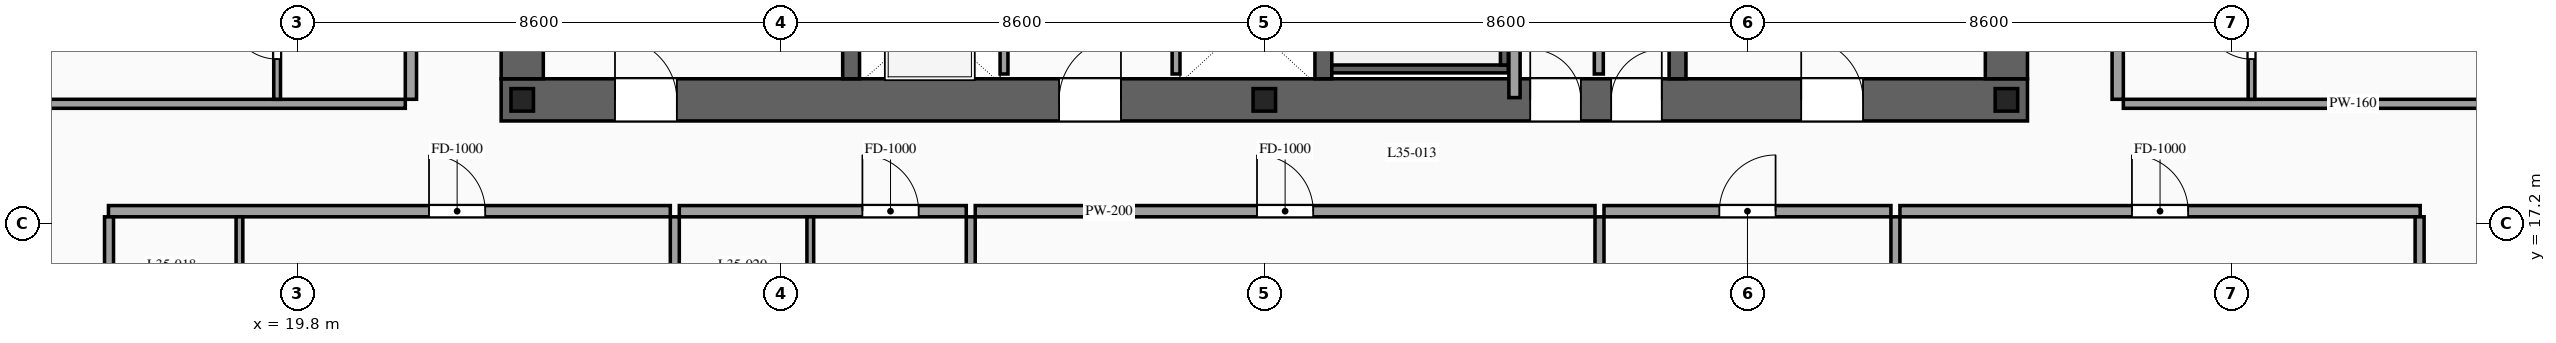
"""IFC4 building model, lengths in metres.
Left out: names, types, materials, properties, quantities, classifications, styles, units other than length and angle.
Written with IfcOpenShell. Run it as: python <this file> out.ifc"""

import sys

from ifc_helpers import new_model, si_unit, direction, frame, frame_2d, origin, origin_2d, place, context, subcontext, project, spatial, rectangle, i_section, extrude, source, transform, mapped, element, fill, save


model = new_model("IFC4")
c1 = context("Model", 3, precision=1e-05, world=origin(), true_north=direction((0.0, 1.0)))
c2 = subcontext(c1, "Body", "Model", "MODEL_VIEW")
j1 = project(units=[si_unit("LENGTHUNIT", "METRE"), si_unit("PLANEANGLEUNIT", "RADIAN")], contexts=[c1])
p1 = place(None, origin())
s1 = spatial("IfcSite", under=j1, at=p1, CompositionType="ELEMENT")
p2 = place(p1, origin())
s2 = spatial("IfcBuilding", under=s1, at=p2, CompositionType="ELEMENT")
p3 = place(p2, frame((0.0, 0.0, 134.4)))
s3 = spatial("IfcBuildingStorey", under=s2, at=p3, CompositionType="ELEMENT", Elevation=134.4)
p4 = place(p3, frame((23.425, 19.4, 0.0), z_axis=(0.0, 0.0, 1.0), x_axis=(1.0, 0.0, 0.0)))
e1 = element("IfcWall", 1, at=p4, inside=s3, PredefinedType="SHEAR", context=c2, shape_type="SweptSolid", body=[
    extrude(rectangle(XDim=27.15, YDim=0.75, at=frame_2d((13.575, 0.0))), origin(), (0.0, 0.0, 1.0), 3.6),
])
p5 = place(p4, frame((2.025, 0.0, 0.0)))
e2 = element("IfcOpeningElement", 2, at=p5, cuts=e1, PredefinedType="OPENING", context=c2, shape_type="SweptSolid", body=[
    extrude(rectangle(XDim=1.1, YDim=2.2, at=frame_2d((0.55, 1.1))), frame((0.0, 0.39, 0.0), z_axis=(0.0, -1.0, 0.0), x_axis=(1.0, 0.0, 0.0)), (0.0, 0.0, 1.0), 0.78),
])
p6 = place(p4, frame((9.925, 0.0, 0.0)))
e3 = element("IfcOpeningElement", 3, at=p6, cuts=e1, PredefinedType="OPENING", context=c2, shape_type="SweptSolid", body=[
    extrude(rectangle(XDim=1.1, YDim=2.2, at=frame_2d((0.55, 1.1))), frame((0.0, 0.39, 0.0), z_axis=(0.0, -1.0, 0.0), x_axis=(1.0, 0.0, 0.0)), (0.0, 0.0, 1.0), 0.78),
])
p7 = place(p4, frame((23.125, 0.0, 0.0)))
e4 = element("IfcOpeningElement", 4, at=p7, cuts=e1, PredefinedType="OPENING", context=c2, shape_type="SweptSolid", body=[
    extrude(rectangle(XDim=1.1, YDim=2.2, at=frame_2d((0.55, 1.1))), frame((0.0, 0.39, 0.0), z_axis=(0.0, -1.0, 0.0), x_axis=(1.0, 0.0, 0.0)), (0.0, 0.0, 1.0), 0.78),
])
p8 = place(p4, frame((19.745, 0.0, 0.0)))
e5 = element("IfcOpeningElement", 5, at=p8, cuts=e1, PredefinedType="OPENING", context=c2, shape_type="SweptSolid", body=[
    extrude(rectangle(XDim=0.9, YDim=2.15, at=frame_2d((0.45, 1.075))), frame((0.0, 0.39, 0.0), z_axis=(0.0, -1.0, 0.0), x_axis=(1.0, 0.0, 0.0)), (0.0, 0.0, 1.0), 0.78),
])
p9 = place(p4, frame((18.305, 0.0, 0.0)))
e6 = element("IfcOpeningElement", 6, at=p9, cuts=e1, PredefinedType="OPENING", context=c2, shape_type="SweptSolid", body=[
    extrude(rectangle(XDim=0.9, YDim=2.15, at=frame_2d((0.45, 1.075))), frame((0.0, 0.39, 0.0), z_axis=(0.0, -1.0, 0.0), x_axis=(1.0, 0.0, 0.0)), (0.0, 0.0, 1.0), 0.78),
])
m1 = source(origin(), c2, "Body", "SweptSolid", [
    extrude(rectangle(XDim=12.05, YDim=0.75, at=frame_2d((6.025, 0.0))), origin(), (0.0, 0.0, 1.0), 3.6),
])
for number, where, z_axis, x_axis in (
    (7, (23.8, 19.775, 0.0), (0.0, 0.0, 1.0), (0.0, 1.0, 0.0)),
    (8, (50.2, 19.775, 0.0), (0.0, 0.0, 1.0), (0.0, 1.0, 0.0)),
):
    element("IfcWall", number, at=place(p3, frame(where, z_axis=z_axis, x_axis=x_axis)), inside=s3, PredefinedType="SHEAR", context=c2, shape_type="MappedRepresentation", body=[
        mapped(m1, transform((0.0, 0.0, 0.0), scale=1.0)),
    ])
m2 = source(origin(), c2, "Body", "SweptSolid", [
    extrude(rectangle(XDim=12.05, YDim=0.3, at=frame_2d((6.025, 0.0))), origin(), (0.0, 0.0, 1.0), 3.6),
])
for number, where, z_axis, x_axis in (
    (9, (29.65, 19.775, 0.0), (0.0, 0.0, 1.0), (0.0, 1.0, 0.0)),
    (10, (38.05, 19.775, 0.0), (0.0, 0.0, 1.0), (0.0, 1.0, 0.0)),
    (11, (44.35, 19.775, 0.0), (0.0, 0.0, 1.0), (0.0, 1.0, 0.0)),
):
    element("IfcWall", number, at=place(p3, frame(where, z_axis=z_axis, x_axis=x_axis)), inside=s3, PredefinedType="SOLIDWALL", context=c2, shape_type="MappedRepresentation", body=[
        mapped(m2, transform((0.0, 0.0, 0.0), scale=1.0)),
    ])
m3 = source(origin(), c2, "Body", "SweptSolid", [
    extrude(i_section(OverallWidth=0.4, OverallDepth=0.4, WebThickness=0.013, FlangeThickness=0.021, at=origin_2d()), origin(), (0.0, 0.0, 1.0), 3.6),
])
for number, where, z_axis, x_axis in (
    (12, (23.8, 19.4, 0.0), (0.0, 0.0, 1.0), (1.0, 0.0, 0.0)),
    (13, (37.0, 19.4, 0.0), (0.0, 0.0, 1.0), (1.0, 0.0, 0.0)),
    (14, (50.2, 19.4, 0.0), (0.0, 0.0, 1.0), (1.0, 0.0, 0.0)),
):
    element("IfcColumn", number, at=place(p3, frame(where, z_axis=z_axis, x_axis=x_axis)), inside=s3, PredefinedType="COLUMN", context=c2, shape_type="MappedRepresentation", body=[
        mapped(m3, transform((0.0, 0.0, 0.0), scale=1.0)),
    ])
p10 = place(p3, frame((32.37, 19.86, 0.0), z_axis=(0.0, 0.0, 1.0), x_axis=(0.0, 1.0, 0.0)))
e15 = element("IfcWall", 15, at=p10, inside=s3, PredefinedType="SOLIDWALL", context=c2, shape_type="SweptSolid", body=[
    extrude(rectangle(XDim=2.04, YDim=0.14, at=frame_2d((1.02, 0.0))), origin(), (0.0, 0.0, 1.0), 3.38),
])
p11 = place(p10, frame((0.47, 0.0, 0.0)))
e16 = element("IfcOpeningElement", 16, at=p11, cuts=e15, PredefinedType="OPENING", context=c2, shape_type="SweptSolid", body=[
    extrude(rectangle(XDim=1.1, YDim=2.2, at=frame_2d((0.55, 1.1))), frame((0.0, 0.085, 0.0), z_axis=(0.0, -1.0, 0.0), x_axis=(1.0, 0.0, 0.0)), (0.0, 0.0, 1.0), 0.17),
])
m4 = source(origin(), c2, "Body", "SweptSolid", [
    extrude(rectangle(XDim=2.04, YDim=0.14, at=frame_2d((1.02, 0.0))), origin(), (0.0, 0.0, 1.0), 3.38),
])
p12 = place(p3, frame((35.43, 19.86, 0.0), z_axis=(0.0, 0.0, 1.0), x_axis=(0.0, 1.0, 0.0)))
e17 = element("IfcWall", 17, at=p12, inside=s3, PredefinedType="SOLIDWALL", context=c2, shape_type="MappedRepresentation", body=[
    mapped(m4, transform((0.0, 0.0, 0.0), scale=1.0)),
])
m5 = source(origin(), c2, "Body", "SweptSolid", [
    extrude(rectangle(XDim=3.14, YDim=0.14, at=frame_2d((1.57, 0.0))), origin(), (0.0, 0.0, 1.0), 3.38),
])
p13 = place(p3, frame((38.2, 19.95, 0.0), z_axis=(0.0, 0.0, 1.0), x_axis=(1.0, 0.0, 0.0)))
e18 = element("IfcWall", 18, at=p13, inside=s3, PredefinedType="SOLIDWALL", context=c2, shape_type="MappedRepresentation", body=[
    mapped(m5, transform((0.0, 0.0, 0.0), scale=1.0)),
])
m6 = source(origin(), c2, "Body", "SweptSolid", [
    extrude(rectangle(XDim=8.94, YDim=0.14, at=frame_2d((4.47, 0.0))), origin(), (0.0, 0.0, 1.0), 3.38),
])
p14 = place(p3, frame((41.27, 20.02, 0.0), z_axis=(0.0, 0.0, 1.0), x_axis=(0.0, 1.0, 0.0)))
e19 = element("IfcWall", 19, at=p14, inside=s3, PredefinedType="SOLIDWALL", context=c2, shape_type="MappedRepresentation", body=[
    mapped(m6, transform((0.0, 0.0, 0.0), scale=1.0)),
])
m7 = source(origin(), c2, "Body", "SweptSolid", [
    extrude(rectangle(XDim=1.34, YDim=0.16, at=frame_2d((0.67, 0.0))), origin(), (0.0, 0.0, 1.0), 3.38),
])
p15 = place(p3, frame((42.95, 19.86, 0.0), z_axis=(0.0, 0.0, 1.0), x_axis=(0.0, 1.0, 0.0)))
e20 = element("IfcWall", 20, at=p15, inside=s3, PredefinedType="PARTITIONING", context=c2, shape_type="MappedRepresentation", body=[
    mapped(m7, transform((0.0, 0.0, 0.0), scale=1.0)),
])
m8 = source(origin(), c2, "Body", "SweptSolid", [
    extrude(rectangle(XDim=6.51, YDim=0.2, at=frame_2d((3.255, 0.0))), origin(), (0.0, 0.0, 1.0), 3.38),
])
p16 = place(p3, frame((41.45, 19.44, 0.0), z_axis=(0.0, 0.0, 1.0), x_axis=(0.0, 1.0, 0.0)))
e21 = element("IfcWall", 21, at=p16, inside=s3, PredefinedType="PARTITIONING", context=c2, shape_type="MappedRepresentation", body=[
    mapped(m8, transform((0.0, 0.0, 0.0), scale=1.0)),
])
p17 = place(p3, frame((16.44, 17.42, 0.0), z_axis=(0.0, 0.0, 1.0), x_axis=(1.0, 0.0, 0.0)))
e22 = element("IfcWall", 22, at=p17, inside=s3, PredefinedType="PARTITIONING", context=c2, shape_type="SweptSolid", body=[
    extrude(rectangle(XDim=9.994, YDim=0.2, at=frame_2d((4.997, 0.0))), origin(), (0.0, 0.0, 1.0), 3.38),
])
p18 = place(p17, frame((5.702, 0.0, 0.0)))
e23 = element("IfcOpeningElement", 23, at=p18, cuts=e22, PredefinedType="OPENING", context=c2, shape_type="SweptSolid", body=[
    extrude(rectangle(XDim=1.0, YDim=2.2, at=frame_2d((0.5, 1.1))), frame((0.0, 0.115, 0.0), z_axis=(0.0, -1.0, 0.0), x_axis=(1.0, 0.0, 0.0)), (0.0, 0.0, 1.0), 0.23),
])
m9 = source(origin(), c2, "Body", "SweptSolid", [
    extrude(rectangle(XDim=14.97, YDim=0.16, at=frame_2d((7.485, 0.0))), origin(), (0.0, 0.0, 1.0), 3.38),
])
p19 = place(p3, frame((26.514, 2.35, 0.0), z_axis=(0.0, 0.0, 1.0), x_axis=(0.0, 1.0, 0.0)))
e24 = element("IfcWall", 24, at=p19, inside=s3, PredefinedType="PARTITIONING", context=c2, shape_type="MappedRepresentation", body=[
    mapped(m9, transform((0.0, 0.0, 0.0), scale=1.0)),
])
m10 = source(origin(), c2, "Body", "SweptSolid", [
    extrude(rectangle(XDim=2.42, YDim=0.12, at=frame_2d((1.21, 0.0))), origin(), (0.0, 0.0, 1.0), 3.38),
])
p20 = place(p3, frame((18.77, 14.9, 0.0), z_axis=(0.0, 0.0, 1.0), x_axis=(0.0, 1.0, 0.0)))
e25 = element("IfcWall", 25, at=p20, inside=s3, PredefinedType="PARTITIONING", context=c2, shape_type="MappedRepresentation", body=[
    mapped(m10, transform((0.0, 0.0, 0.0), scale=1.0)),
])
p21 = place(p3, frame((26.594, 17.42, 0.0), z_axis=(0.0, 0.0, 1.0), x_axis=(1.0, 0.0, 0.0)))
e26 = element("IfcWall", 26, at=p21, inside=s3, PredefinedType="PARTITIONING", context=c2, shape_type="SweptSolid", body=[
    extrude(rectangle(XDim=5.104, YDim=0.2, at=frame_2d((2.552, 0.0))), origin(), (0.0, 0.0, 1.0), 3.38),
])
p22 = place(p21, frame((3.257, 0.0, 0.0)))
e27 = element("IfcOpeningElement", 27, at=p22, cuts=e26, PredefinedType="OPENING", context=c2, shape_type="SweptSolid", body=[
    extrude(rectangle(XDim=1.0, YDim=2.2, at=frame_2d((0.5, 1.1))), frame((0.0, 0.115, 0.0), z_axis=(0.0, -1.0, 0.0), x_axis=(1.0, 0.0, 0.0)), (0.0, 0.0, 1.0), 0.23),
])
p23 = place(p3, frame((31.778, 2.35, 0.0), z_axis=(0.0, 0.0, 1.0), x_axis=(0.0, 1.0, 0.0)))
e28 = element("IfcWall", 28, at=p23, inside=s3, PredefinedType="PARTITIONING", context=c2, shape_type="MappedRepresentation", body=[
    mapped(m9, transform((0.0, 0.0, 0.0), scale=1.0)),
])
p24 = place(p3, frame((28.924, 14.9, 0.0), z_axis=(0.0, 0.0, 1.0), x_axis=(0.0, 1.0, 0.0)))
e29 = element("IfcWall", 29, at=p24, inside=s3, PredefinedType="PARTITIONING", context=c2, shape_type="MappedRepresentation", body=[
    mapped(m10, transform((0.0, 0.0, 0.0), scale=1.0)),
])
p25 = place(p3, frame((31.858, 17.42, 0.0), z_axis=(0.0, 0.0, 1.0), x_axis=(1.0, 0.0, 0.0)))
e30 = element("IfcWall", 30, at=p25, inside=s3, PredefinedType="PARTITIONING", context=c2, shape_type="SweptSolid", body=[
    extrude(rectangle(XDim=11.024, YDim=0.2, at=frame_2d((5.512, 0.0))), origin(), (0.0, 0.0, 1.0), 3.38),
])
p26 = place(p25, frame((5.012, 0.0, 0.0)))
e31 = element("IfcOpeningElement", 31, at=p26, cuts=e30, PredefinedType="OPENING", context=c2, shape_type="SweptSolid", body=[
    extrude(rectangle(XDim=1.0, YDim=2.2, at=frame_2d((0.5, 1.1))), frame((0.0, 0.115, 0.0), z_axis=(0.0, -1.0, 0.0), x_axis=(1.0, 0.0, 0.0)), (0.0, 0.0, 1.0), 0.23),
])
p27 = place(p3, frame((42.962, 2.35, 0.0), z_axis=(0.0, 0.0, 1.0), x_axis=(0.0, 1.0, 0.0)))
e32 = element("IfcWall", 32, at=p27, inside=s3, PredefinedType="PARTITIONING", context=c2, shape_type="MappedRepresentation", body=[
    mapped(m9, transform((0.0, 0.0, 0.0), scale=1.0)),
])
p28 = place(p3, frame((43.042, 17.42, 0.0), z_axis=(0.0, 0.0, 1.0), x_axis=(1.0, 0.0, 0.0)))
e33 = element("IfcWall", 33, at=p28, inside=s3, PredefinedType="PARTITIONING", context=c2, shape_type="SweptSolid", body=[
    extrude(rectangle(XDim=5.104, YDim=0.2, at=frame_2d((2.552, 0.0))), origin(), (0.0, 0.0, 1.0), 3.38),
])
p29 = place(p28, frame((2.052, 0.0, 0.0)))
e34 = element("IfcOpeningElement", 34, at=p29, cuts=e33, PredefinedType="OPENING", context=c2, shape_type="SweptSolid", body=[
    extrude(rectangle(XDim=1.0, YDim=2.2, at=frame_2d((0.5, 1.1))), frame((0.0, 0.115, 0.0), z_axis=(0.0, -1.0, 0.0), x_axis=(1.0, 0.0, 0.0)), (0.0, 0.0, 1.0), 0.23),
])
p30 = place(p3, frame((48.226, 2.35, 0.0), z_axis=(0.0, 0.0, 1.0), x_axis=(0.0, 1.0, 0.0)))
e35 = element("IfcWall", 35, at=p30, inside=s3, PredefinedType="PARTITIONING", context=c2, shape_type="MappedRepresentation", body=[
    mapped(m9, transform((0.0, 0.0, 0.0), scale=1.0)),
])
p31 = place(p3, frame((48.306, 17.42, 0.0), z_axis=(0.0, 0.0, 1.0), x_axis=(1.0, 0.0, 0.0)))
e36 = element("IfcWall", 36, at=p31, inside=s3, PredefinedType="PARTITIONING", context=c2, shape_type="SweptSolid", body=[
    extrude(rectangle(XDim=9.254, YDim=0.2, at=frame_2d((4.627, 0.0))), origin(), (0.0, 0.0, 1.0), 3.38),
])
p32 = place(p31, frame((4.127, 0.0, 0.0)))
e37 = element("IfcOpeningElement", 37, at=p32, cuts=e36, PredefinedType="OPENING", context=c2, shape_type="SweptSolid", body=[
    extrude(rectangle(XDim=1.0, YDim=2.2, at=frame_2d((0.5, 1.1))), frame((0.0, 0.115, 0.0), z_axis=(0.0, -1.0, 0.0), x_axis=(1.0, 0.0, 0.0)), (0.0, 0.0, 1.0), 0.23),
])
m11 = source(origin(), c2, "Body", "SweptSolid", [
    extrude(rectangle(XDim=14.82, YDim=0.16, at=frame_2d((7.41, 0.0))), origin(), (0.0, 0.0, 1.0), 3.38),
])
for number, where, z_axis, x_axis in (
    (38, (16.45, 2.5, 0.0), (0.0, 0.0, 1.0), (0.0, 1.0, 0.0)),
    (39, (57.55, 2.5, 0.0), (0.0, 0.0, 1.0), (0.0, 1.0, 0.0)),
):
    element("IfcWall", number, at=place(p3, frame(where, z_axis=z_axis, x_axis=x_axis)), inside=s3, PredefinedType="PARTITIONING", context=c2, shape_type="MappedRepresentation", body=[
        mapped(m11, transform((0.0, 0.0, 0.0), scale=1.0)),
    ])
p33 = place(p3, frame((21.82, 19.41, 0.0), z_axis=(0.0, 0.0, 1.0), x_axis=(0.0, 1.0, 0.0)))
e40 = element("IfcWall", 40, at=p33, inside=s3, PredefinedType="PARTITIONING", context=c2, shape_type="SweptSolid", body=[
    extrude(rectangle(XDim=6.31, YDim=0.2, at=frame_2d((3.155, 0.0))), origin(), (0.0, 0.0, 1.0), 3.38),
])
p34 = place(p33, frame((3.835, 0.0, 0.0)))
e41 = element("IfcOpeningElement", 41, at=p34, cuts=e40, PredefinedType="OPENING", context=c2, shape_type="SweptSolid", body=[
    extrude(rectangle(XDim=1.0, YDim=2.2, at=frame_2d((0.5, 1.1))), frame((0.0, 0.115, 0.0), z_axis=(0.0, -1.0, 0.0), x_axis=(1.0, 0.0, 0.0)), (0.0, 0.0, 1.0), 0.23),
])
m12 = source(origin(), c2, "Body", "SweptSolid", [
    extrude(rectangle(XDim=8.17, YDim=0.16, at=frame_2d((4.085, 0.0))), origin(), (0.0, 0.0, 1.0), 2.875),
])
p35 = place(p3, frame((13.55, 19.33, 0.0), z_axis=(0.0, 0.0, 1.0), x_axis=(1.0, 0.0, 0.0)))
e42 = element("IfcWall", 42, at=p35, inside=s3, PredefinedType="PARTITIONING", context=c2, shape_type="MappedRepresentation", body=[
    mapped(m12, transform((0.0, 0.0, 0.0), scale=1.0)),
])
p36 = place(p3, frame((19.44, 19.41, 0.0), z_axis=(0.0, 0.0, 1.0), x_axis=(0.0, 1.0, 0.0)))
e43 = element("IfcWall", 43, at=p36, inside=s3, PredefinedType="PARTITIONING", context=c2, shape_type="SweptSolid", body=[
    extrude(rectangle(XDim=2.28, YDim=0.12, at=frame_2d((1.14, 0.0))), origin(), (0.0, 0.0, 1.0), 3.38),
])
p37 = place(p36, frame((0.715, 0.0, 0.0)))
e44 = element("IfcOpeningElement", 44, at=p37, cuts=e43, PredefinedType="OPENING", context=c2, shape_type="SweptSolid", body=[
    extrude(rectangle(XDim=0.85, YDim=2.1, at=frame_2d((0.425, 1.05))), frame((0.0, 0.075, 0.0), z_axis=(0.0, -1.0, 0.0), x_axis=(1.0, 0.0, 0.0)), (0.0, 0.0, 1.0), 0.15),
])
p38 = place(p3, frame((52.18, 19.41, 0.0), z_axis=(0.0, 0.0, 1.0), x_axis=(0.0, 1.0, 0.0)))
e45 = element("IfcWall", 45, at=p38, inside=s3, PredefinedType="PARTITIONING", context=c2, shape_type="SweptSolid", body=[
    extrude(rectangle(XDim=6.31, YDim=0.2, at=frame_2d((3.155, 0.0))), origin(), (0.0, 0.0, 1.0), 3.38),
])
p39 = place(p38, frame((3.835, 0.0, 0.0)))
e46 = element("IfcOpeningElement", 46, at=p39, cuts=e45, PredefinedType="OPENING", context=c2, shape_type="SweptSolid", body=[
    extrude(rectangle(XDim=1.0, YDim=2.2, at=frame_2d((0.5, 1.1))), frame((0.0, 0.115, 0.0), z_axis=(0.0, -1.0, 0.0), x_axis=(1.0, 0.0, 0.0)), (0.0, 0.0, 1.0), 0.23),
])
p40 = place(p3, frame((52.28, 19.33, 0.0), z_axis=(0.0, 0.0, 1.0), x_axis=(1.0, 0.0, 0.0)))
e47 = element("IfcWall", 47, at=p40, inside=s3, PredefinedType="PARTITIONING", context=c2, shape_type="MappedRepresentation", body=[
    mapped(m12, transform((0.0, 0.0, 0.0), scale=1.0)),
])
p41 = place(p3, frame((54.56, 19.41, 0.0), z_axis=(0.0, 0.0, 1.0), x_axis=(0.0, 1.0, 0.0)))
e48 = element("IfcWall", 48, at=p41, inside=s3, PredefinedType="PARTITIONING", context=c2, shape_type="SweptSolid", body=[
    extrude(rectangle(XDim=2.28, YDim=0.12, at=frame_2d((1.14, 0.0))), origin(), (0.0, 0.0, 1.0), 3.38),
])
p42 = place(p41, frame((0.715, 0.0, 0.0)))
e49 = element("IfcOpeningElement", 49, at=p42, cuts=e48, PredefinedType="OPENING", context=c2, shape_type="SweptSolid", body=[
    extrude(rectangle(XDim=0.85, YDim=2.1, at=frame_2d((0.425, 1.05))), frame((0.0, 0.075, 0.0), z_axis=(0.0, -1.0, 0.0), x_axis=(1.0, 0.0, 0.0)), (0.0, 0.0, 1.0), 0.15),
])
m13 = source(origin(), c2, "Body", "SweptSolid", [
    extrude(rectangle(XDim=1.1, YDim=2.2, at=frame_2d((0.55, 1.1))), frame((0.0, 0.025, 0.0), z_axis=(0.0, -1.0, 0.0), x_axis=(1.0, 0.0, 0.0)), (0.0, 0.0, 1.0), 0.05),
])
p43 = place(p5, origin())
e50 = element("IfcDoor", 50, at=p43, inside=s3, OperationType="SINGLE_SWING_LEFT", PredefinedType="DOOR", context=c2, shape_type="MappedRepresentation", body=[
    mapped(m13, transform((0.0, 0.0, 0.0), scale=1.0)),
])
fill(e2, e50)
p44 = place(p6, origin())
e51 = element("IfcDoor", 51, at=p44, inside=s3, OperationType="SINGLE_SWING_RIGHT", PredefinedType="DOOR", context=c2, shape_type="MappedRepresentation", body=[
    mapped(m13, transform((0.0, 0.0, 0.0), scale=1.0)),
])
fill(e3, e51)
p45 = place(p7, origin())
e52 = element("IfcDoor", 52, at=p45, inside=s3, OperationType="SINGLE_SWING_LEFT", PredefinedType="DOOR", context=c2, shape_type="MappedRepresentation", body=[
    mapped(m13, transform((0.0, 0.0, 0.0), scale=1.0)),
])
fill(e4, e52)
m14 = source(origin(), c2, "Body", "SweptSolid", [
    extrude(rectangle(XDim=0.9, YDim=2.15, at=frame_2d((0.45, 1.075))), frame((0.0, 0.025, 0.0), z_axis=(0.0, -1.0, 0.0), x_axis=(1.0, 0.0, 0.0)), (0.0, 0.0, 1.0), 0.05),
])
p46 = place(p8, origin())
e53 = element("IfcDoor", 53, at=p46, inside=s3, OperationType="SINGLE_SWING_RIGHT", PredefinedType="DOOR", context=c2, shape_type="MappedRepresentation", body=[
    mapped(m14, transform((0.0, 0.0, 0.0), scale=1.0)),
])
fill(e5, e53)
p47 = place(p9, origin())
e54 = element("IfcDoor", 54, at=p47, inside=s3, OperationType="SINGLE_SWING_LEFT", PredefinedType="DOOR", context=c2, shape_type="MappedRepresentation", body=[
    mapped(m14, transform((0.0, 0.0, 0.0), scale=1.0)),
])
fill(e6, e54)
m15 = source(origin(), c2, "Body", "SweptSolid", [
    extrude(rectangle(XDim=1.0, YDim=2.2, at=frame_2d((0.5, 1.1))), frame((0.0, 0.025, 0.0), z_axis=(0.0, -1.0, 0.0), x_axis=(1.0, 0.0, 0.0)), (0.0, 0.0, 1.0), 0.05),
])
p48 = place(p18, origin())
e55 = element("IfcDoor", 55, at=p48, inside=s3, OperationType="SINGLE_SWING_LEFT", PredefinedType="DOOR", context=c2, shape_type="MappedRepresentation", body=[
    mapped(m15, transform((0.0, 0.0, 0.0), scale=1.0)),
])
fill(e23, e55)
p49 = place(p22, origin())
e56 = element("IfcDoor", 56, at=p49, inside=s3, OperationType="SINGLE_SWING_LEFT", PredefinedType="DOOR", context=c2, shape_type="MappedRepresentation", body=[
    mapped(m15, transform((0.0, 0.0, 0.0), scale=1.0)),
])
fill(e27, e56)
p50 = place(p26, origin())
e57 = element("IfcDoor", 57, at=p50, inside=s3, OperationType="SINGLE_SWING_LEFT", PredefinedType="DOOR", context=c2, shape_type="MappedRepresentation", body=[
    mapped(m15, transform((0.0, 0.0, 0.0), scale=1.0)),
])
fill(e31, e57)
p51 = place(p29, origin())
e58 = element("IfcDoor", 58, at=p51, inside=s3, OperationType="SINGLE_SWING_RIGHT", PredefinedType="DOOR", context=c2, shape_type="MappedRepresentation", body=[
    mapped(m15, transform((0.0, 0.0, 0.0), scale=1.0)),
])
fill(e34, e58)
p52 = place(p32, origin())
e59 = element("IfcDoor", 59, at=p52, inside=s3, OperationType="SINGLE_SWING_LEFT", PredefinedType="DOOR", context=c2, shape_type="MappedRepresentation", body=[
    mapped(m15, transform((0.0, 0.0, 0.0), scale=1.0)),
])
fill(e37, e59)
m16 = source(origin(), c2, "Body", "SweptSolid", [
    extrude(rectangle(XDim=0.85, YDim=2.1, at=frame_2d((0.425, 1.05))), frame((0.0, 0.025, 0.0), z_axis=(0.0, -1.0, 0.0), x_axis=(1.0, 0.0, 0.0)), (0.0, 0.0, 1.0), 0.05),
])
p53 = place(p37, origin())
e60 = element("IfcDoor", 60, at=p53, inside=s3, OperationType="SINGLE_SWING_RIGHT", PredefinedType="DOOR", context=c2, shape_type="MappedRepresentation", body=[
    mapped(m16, transform((0.0, 0.0, 0.0), scale=1.0)),
])
fill(e44, e60)
p54 = place(p42, origin())
e61 = element("IfcDoor", 61, at=p54, inside=s3, OperationType="SINGLE_SWING_RIGHT", PredefinedType="DOOR", context=c2, shape_type="MappedRepresentation", body=[
    mapped(m16, transform((0.0, 0.0, 0.0), scale=1.0)),
])
fill(e49, e61)
save(model, sys.argv[1])
